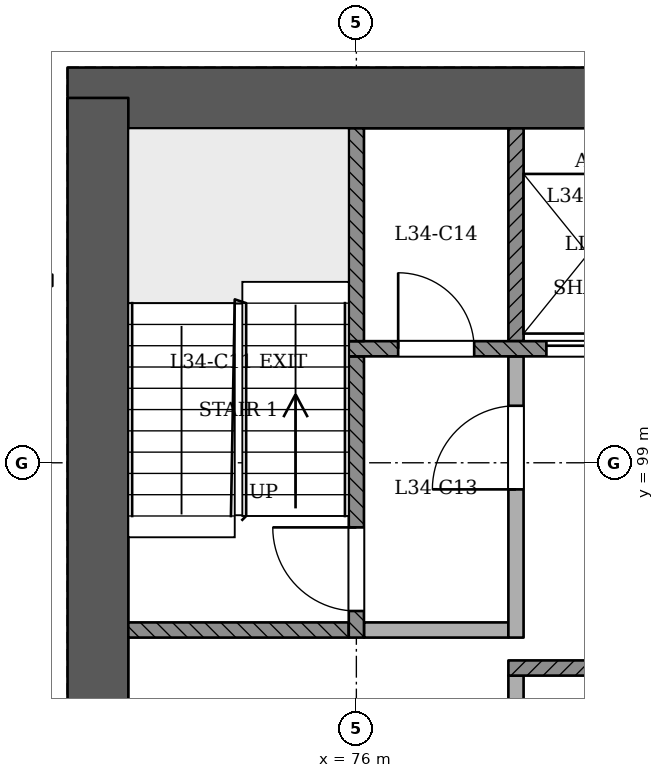
"""IFC4 building model, lengths in metres.
Left out: names, types, materials, properties, quantities, classifications, styles, units other than length and angle.
Written with IfcOpenShell. Run it as: python <this file> out.ifc"""

import sys

from ifc_helpers import new_model, si_unit, direction, frame, frame_2d, origin, place, context, subcontext, project, spatial, rectangle, extrude, element, fill, save


model = new_model("IFC4")
c1 = context("Model", 3, precision=1e-05, world=origin(), true_north=direction((0.0, 1.0)))
c2 = subcontext(c1, "Body", "Model", "MODEL_VIEW")
j1 = project(units=[si_unit("LENGTHUNIT", "METRE"), si_unit("PLANEANGLEUNIT", "RADIAN")], contexts=[c1])
p1 = place(None, origin())
s1 = spatial("IfcSite", under=j1, at=p1, CompositionType="ELEMENT")
p2 = place(p1, origin())
s2 = spatial("IfcBuilding", under=s1, at=p2, CompositionType="ELEMENT")
p3 = place(p2, frame((0.0, 0.0, 135.0)))
s3 = spatial("IfcBuildingStorey", under=s2, at=p3, CompositionType="ELEMENT", Elevation=135.0)
p4 = place(p3, frame((97.4, 103.8, 0.0), z_axis=(0.0, 0.0, 1.0), x_axis=(-1.0, 0.0, 0.0)))
e1 = element("IfcWall", 1, at=p4, inside=s3, PredefinedType="SHEAR", context=c2, shape_type="SweptSolid", body=[
    extrude(rectangle(XDim=25.2, YDim=0.8, at=frame_2d((12.6, 0.0))), origin(), (0.0, 0.0, 1.0), 3.6),
])
p5 = place(p3, frame((72.6, 103.8, 0.0), z_axis=(0.0, 0.0, 1.0), x_axis=(0.0, -1.0, 0.0)))
e2 = element("IfcWall", 2, at=p5, inside=s3, PredefinedType="SHEAR", context=c2, shape_type="SweptSolid", body=[
    extrude(rectangle(XDim=11.2, YDim=0.8, at=frame_2d((5.6, 0.0))), origin(), (0.0, 0.0, 1.0), 3.6),
])
p6 = place(p3, frame((64.777, 98.34, 0.0), z_axis=(0.0, 0.0, 1.0), x_axis=(0.499997513821, -0.866026839176, 0.0)))
e3 = element("IfcWall", 3, at=p6, inside=s3, PredefinedType="PARTITIONING", context=c2, shape_type="SweptSolid", body=[
    extrude(rectangle(XDim=40.26, YDim=0.15, at=frame_2d((20.13, 0.0))), origin(), (0.0, 0.0, 1.0), 2.75),
])
p7 = place(p6, frame((0.2, 0.0, 0.0)))
e4 = element("IfcOpeningElement", 4, at=p7, cuts=e3, PredefinedType="OPENING", context=c2, shape_type="SweptSolid", body=[
    extrude(rectangle(XDim=1.2, YDim=2.1, at=frame_2d((0.6, 1.05))), frame((0.0, 0.085, 0.0), z_axis=(0.0, -1.0, 0.0), x_axis=(1.0, 0.0, 0.0)), (0.0, 0.0, 1.0), 0.171),
])
p8 = place(p6, frame((9.525, 0.0, 0.0)))
e5 = element("IfcOpeningElement", 5, at=p8, cuts=e3, PredefinedType="OPENING", context=c2, shape_type="SweptSolid", body=[
    extrude(rectangle(XDim=1.0, YDim=2.1, at=frame_2d((0.5, 1.05))), frame((0.0, 0.085, 0.0), z_axis=(0.0, -1.0, 0.0), x_axis=(1.0, 0.0, 0.0)), (0.0, 0.0, 1.0), 0.171),
])
p9 = place(p6, frame((11.735, 0.0, 0.0)))
e6 = element("IfcOpeningElement", 6, at=p9, cuts=e3, PredefinedType="OPENING", context=c2, shape_type="SweptSolid", body=[
    extrude(rectangle(XDim=1.0, YDim=2.1, at=frame_2d((0.5, 1.05))), frame((0.0, 0.085, 0.0), z_axis=(0.0, -1.0, 0.0), x_axis=(1.0, 0.0, 0.0)), (0.0, 0.0, 1.0), 0.171),
])
p10 = place(p6, frame((19.53, 0.0, 0.0)))
e7 = element("IfcOpeningElement", 7, at=p10, cuts=e3, PredefinedType="OPENING", context=c2, shape_type="SweptSolid", body=[
    extrude(rectangle(XDim=1.2, YDim=2.1, at=frame_2d((0.6, 1.05))), frame((0.0, 0.085, 0.0), z_axis=(0.0, -1.0, 0.0), x_axis=(1.0, 0.0, 0.0)), (0.0, 0.0, 1.0), 0.171),
])
p11 = place(p6, frame((27.41, 0.0, 0.0)))
e8 = element("IfcOpeningElement", 8, at=p11, cuts=e3, PredefinedType="OPENING", context=c2, shape_type="SweptSolid", body=[
    extrude(rectangle(XDim=1.0, YDim=2.1, at=frame_2d((0.5, 1.05))), frame((0.0, 0.085, 0.0), z_axis=(0.0, -1.0, 0.0), x_axis=(1.0, 0.0, 0.0)), (0.0, 0.0, 1.0), 0.171),
])
p12 = place(p6, frame((34.13, 0.0, 0.0)))
e9 = element("IfcOpeningElement", 9, at=p12, cuts=e3, PredefinedType="OPENING", context=c2, shape_type="SweptSolid", body=[
    extrude(rectangle(XDim=1.2, YDim=2.1, at=frame_2d((0.6, 1.05))), frame((0.0, 0.085, 0.0), z_axis=(0.0, -1.0, 0.0), x_axis=(1.0, 0.0, 0.0)), (0.0, 0.0, 1.0), 0.171),
])
p13 = place(p6, frame((38.78, 0.0, 0.0)))
e10 = element("IfcOpeningElement", 10, at=p13, cuts=e3, PredefinedType="OPENING", context=c2, shape_type="SweptSolid", body=[
    extrude(rectangle(XDim=1.0, YDim=2.1, at=frame_2d((0.5, 1.05))), frame((0.0, 0.085, 0.0), z_axis=(0.0, -1.0, 0.0), x_axis=(1.0, 0.0, 0.0)), (0.0, 0.0, 1.0), 0.171),
])
p14 = place(p3, frame((78.1, 93.4, 0.0), z_axis=(0.0, 0.0, 1.0), x_axis=(0.0, 1.0, 0.0)))
e11 = element("IfcWall", 11, at=p14, inside=s3, PredefinedType="PARTITIONING", context=c2, shape_type="SweptSolid", body=[
    extrude(rectangle(XDim=2.8, YDim=0.2, at=frame_2d((1.4, 0.0))), origin(), (0.0, 0.0, 1.0), 3.15),
])
p15 = place(p3, frame((78.0, 96.3, 0.0), z_axis=(0.0, 0.0, 1.0), x_axis=(1.0, 0.0, 0.0)))
e12 = element("IfcWall", 12, at=p15, inside=s3, PredefinedType="SOLIDWALL", context=c2, shape_type="SweptSolid", body=[
    extrude(rectangle(XDim=7.8, YDim=0.2, at=frame_2d((3.9, 0.0))), origin(), (0.0, 0.0, 1.0), 3.15),
])
p16 = place(p15, frame((1.5, 0.0, 0.0)))
e13 = element("IfcOpeningElement", 13, at=p16, cuts=e12, PredefinedType="OPENING", context=c2, shape_type="SweptSolid", body=[
    extrude(rectangle(XDim=1.0, YDim=2.1, at=frame_2d((0.5, 1.05))), frame((0.0, 0.11, 0.0), z_axis=(0.0, -1.0, 0.0), x_axis=(1.0, 0.0, 0.0)), (0.0, 0.0, 1.0), 0.221),
])
p17 = place(p3, frame((73.0, 96.8, 0.0), z_axis=(0.0, 0.0, 1.0), x_axis=(1.0, 0.0, 0.0)))
e14 = element("IfcWall", 14, at=p17, inside=s3, PredefinedType="SOLIDWALL", context=c2, shape_type="SweptSolid", body=[
    extrude(rectangle(XDim=2.9, YDim=0.2, at=frame_2d((1.45, 0.0))), origin(), (0.0, 0.0, 1.0), 3.15),
])
p18 = place(p3, frame((76.0, 96.7, 0.0), z_axis=(0.0, 0.0, 1.0), x_axis=(0.0, 1.0, 0.0)))
e15 = element("IfcWall", 15, at=p18, inside=s3, PredefinedType="SOLIDWALL", context=c2, shape_type="SweptSolid", body=[
    extrude(rectangle(XDim=3.7, YDim=0.2, at=frame_2d((1.85, 0.0))), origin(), (0.0, 0.0, 1.0), 3.15),
])
p19 = place(p18, frame((0.35, 0.0, 0.0)))
e16 = element("IfcOpeningElement", 16, at=p19, cuts=e15, PredefinedType="OPENING", context=c2, shape_type="SweptSolid", body=[
    extrude(rectangle(XDim=1.1, YDim=2.1, at=frame_2d((0.55, 1.05))), frame((0.0, 0.11, 0.0), z_axis=(0.0, -1.0, 0.0), x_axis=(1.0, 0.0, 0.0)), (0.0, 0.0, 1.0), 0.221),
])
p20 = place(p3, frame((76.1, 96.8, 0.0), z_axis=(0.0, 0.0, 1.0), x_axis=(1.0, 0.0, 0.0)))
e17 = element("IfcWall", 17, at=p20, inside=s3, PredefinedType="PARTITIONING", context=c2, shape_type="SweptSolid", body=[
    extrude(rectangle(XDim=1.9, YDim=0.2, at=frame_2d((0.95, 0.0))), origin(), (0.0, 0.0, 1.0), 3.15),
])
p21 = place(p3, frame((78.1, 96.7, 0.0), z_axis=(0.0, 0.0, 1.0), x_axis=(0.0, 1.0, 0.0)))
e18 = element("IfcWall", 18, at=p21, inside=s3, PredefinedType="PARTITIONING", context=c2, shape_type="SweptSolid", body=[
    extrude(rectangle(XDim=3.7, YDim=0.2, at=frame_2d((1.85, 0.0))), origin(), (0.0, 0.0, 1.0), 3.15),
])
p22 = place(p21, frame((1.95, 0.0, 0.0)))
e19 = element("IfcOpeningElement", 19, at=p22, cuts=e18, PredefinedType="OPENING", context=c2, shape_type="SweptSolid", body=[
    extrude(rectangle(XDim=1.1, YDim=2.1, at=frame_2d((0.55, 1.05))), frame((0.0, 0.11, 0.0), z_axis=(0.0, -1.0, 0.0), x_axis=(1.0, 0.0, 0.0)), (0.0, 0.0, 1.0), 0.221),
])
p23 = place(p3, frame((75.9, 100.5, 0.0), z_axis=(0.0, 0.0, 1.0), x_axis=(1.0, 0.0, 0.0)))
e20 = element("IfcWall", 20, at=p23, inside=s3, PredefinedType="SOLIDWALL", context=c2, shape_type="SweptSolid", body=[
    extrude(rectangle(XDim=18.2, YDim=0.2, at=frame_2d((9.1, 0.0))), origin(), (0.0, 0.0, 1.0), 3.15),
])
p24 = place(p23, frame((2.6, 0.0, 0.0)))
e21 = element("IfcOpeningElement", 21, at=p24, cuts=e20, PredefinedType="OPENING", context=c2, shape_type="SweptSolid", body=[
    extrude(rectangle(XDim=1.1, YDim=2.1, at=frame_2d((0.55, 1.05))), frame((0.0, 0.11, 0.0), z_axis=(0.0, -1.0, 0.0), x_axis=(1.0, 0.0, 0.0)), (0.0, 0.0, 1.0), 0.221),
])
p25 = place(p23, frame((4.5, 0.0, 0.0)))
e22 = element("IfcOpeningElement", 22, at=p25, cuts=e20, PredefinedType="OPENING", context=c2, shape_type="SweptSolid", body=[
    extrude(rectangle(XDim=1.1, YDim=2.1, at=frame_2d((0.55, 1.05))), frame((0.0, 0.11, 0.0), z_axis=(0.0, -1.0, 0.0), x_axis=(1.0, 0.0, 0.0)), (0.0, 0.0, 1.0), 0.221),
])
p26 = place(p23, frame((6.4, 0.0, 0.0)))
e23 = element("IfcOpeningElement", 23, at=p26, cuts=e20, PredefinedType="OPENING", context=c2, shape_type="SweptSolid", body=[
    extrude(rectangle(XDim=1.1, YDim=2.1, at=frame_2d((0.55, 1.05))), frame((0.0, 0.11, 0.0), z_axis=(0.0, -1.0, 0.0), x_axis=(1.0, 0.0, 0.0)), (0.0, 0.0, 1.0), 0.221),
])
p27 = place(p23, frame((8.3, 0.0, 0.0)))
e24 = element("IfcOpeningElement", 24, at=p27, cuts=e20, PredefinedType="OPENING", context=c2, shape_type="SweptSolid", body=[
    extrude(rectangle(XDim=1.1, YDim=2.1, at=frame_2d((0.55, 1.05))), frame((0.0, 0.11, 0.0), z_axis=(0.0, -1.0, 0.0), x_axis=(1.0, 0.0, 0.0)), (0.0, 0.0, 1.0), 0.221),
])
p28 = place(p23, frame((10.2, 0.0, 0.0)))
e25 = element("IfcOpeningElement", 25, at=p28, cuts=e20, PredefinedType="OPENING", context=c2, shape_type="SweptSolid", body=[
    extrude(rectangle(XDim=1.1, YDim=2.1, at=frame_2d((0.55, 1.05))), frame((0.0, 0.11, 0.0), z_axis=(0.0, -1.0, 0.0), x_axis=(1.0, 0.0, 0.0)), (0.0, 0.0, 1.0), 0.221),
])
p29 = place(p23, frame((12.1, 0.0, 0.0)))
e26 = element("IfcOpeningElement", 26, at=p29, cuts=e20, PredefinedType="OPENING", context=c2, shape_type="SweptSolid", body=[
    extrude(rectangle(XDim=1.1, YDim=2.1, at=frame_2d((0.55, 1.05))), frame((0.0, 0.11, 0.0), z_axis=(0.0, -1.0, 0.0), x_axis=(1.0, 0.0, 0.0)), (0.0, 0.0, 1.0), 0.221),
])
p30 = place(p23, frame((14.0, 0.0, 0.0)))
e27 = element("IfcOpeningElement", 27, at=p30, cuts=e20, PredefinedType="OPENING", context=c2, shape_type="SweptSolid", body=[
    extrude(rectangle(XDim=1.1, YDim=2.1, at=frame_2d((0.55, 1.05))), frame((0.0, 0.11, 0.0), z_axis=(0.0, -1.0, 0.0), x_axis=(1.0, 0.0, 0.0)), (0.0, 0.0, 1.0), 0.221),
])
p31 = place(p23, frame((0.65, 0.0, 0.0)))
e28 = element("IfcOpeningElement", 28, at=p31, cuts=e20, PredefinedType="OPENING", context=c2, shape_type="SweptSolid", body=[
    extrude(rectangle(XDim=1.0, YDim=2.1, at=frame_2d((0.5, 1.05))), frame((0.0, 0.11, 0.0), z_axis=(0.0, -1.0, 0.0), x_axis=(1.0, 0.0, 0.0)), (0.0, 0.0, 1.0), 0.221),
])
p32 = place(p23, frame((16.3, 0.0, 0.0)))
e29 = element("IfcOpeningElement", 29, at=p32, cuts=e20, PredefinedType="OPENING", context=c2, shape_type="SweptSolid", body=[
    extrude(rectangle(XDim=1.0, YDim=2.1, at=frame_2d((0.5, 1.05))), frame((0.0, 0.11, 0.0), z_axis=(0.0, -1.0, 0.0), x_axis=(1.0, 0.0, 0.0)), (0.0, 0.0, 1.0), 0.221),
])
for number, where, z_axis, x_axis in (
    (30, (76.0, 100.6, 0.0), (0.0, 0.0, 1.0), (0.0, 1.0, 0.0)),
    (31, (78.1, 100.6, 0.0), (0.0, 0.0, 1.0), (0.0, 1.0, 0.0)),
):
    element("IfcWall", number, at=place(p3, frame(where, z_axis=z_axis, x_axis=x_axis)), inside=s3, PredefinedType="SOLIDWALL", context=c2, shape_type="SweptSolid", body=[
        extrude(rectangle(XDim=2.8, YDim=0.2, at=frame_2d((1.4, 0.0))), origin(), (0.0, 0.0, 1.0), 3.15),
    ])
p33 = place(p24, origin())
e32 = element("IfcDoor", 32, at=p33, inside=s3, OperationType="SLIDING_TO_RIGHT", PredefinedType="NOTDEFINED", context=c2, shape_type="SweptSolid", body=[
    extrude(rectangle(XDim=1.1, YDim=2.1, at=frame_2d((0.55, 1.05))), frame((0.0, 0.025, 0.0), z_axis=(0.0, -1.0, 0.0), x_axis=(1.0, 0.0, 0.0)), (0.0, 0.0, 1.0), 0.05),
])
fill(e21, e32)
p34 = place(p19, origin())
e33 = element("IfcDoor", 33, at=p34, inside=s3, OperationType="SINGLE_SWING_RIGHT", PredefinedType="NOTDEFINED", context=c2, shape_type="SweptSolid", body=[
    extrude(rectangle(XDim=1.1, YDim=2.1, at=frame_2d((0.55, 1.05))), frame((0.0, 0.025, 0.0), z_axis=(0.0, -1.0, 0.0), x_axis=(1.0, 0.0, 0.0)), (0.0, 0.0, 1.0), 0.05),
])
fill(e16, e33)
p35 = place(p22, origin())
e34 = element("IfcDoor", 34, at=p35, inside=s3, OperationType="SINGLE_SWING_LEFT", PredefinedType="NOTDEFINED", context=c2, shape_type="SweptSolid", body=[
    extrude(rectangle(XDim=1.1, YDim=2.1, at=frame_2d((0.55, 1.05))), frame((0.0, 0.025, 0.0), z_axis=(0.0, -1.0, 0.0), x_axis=(1.0, 0.0, 0.0)), (0.0, 0.0, 1.0), 0.05),
])
fill(e19, e34)
p36 = place(p31, origin())
e35 = element("IfcDoor", 35, at=p36, inside=s3, OperationType="SINGLE_SWING_LEFT", PredefinedType="NOTDEFINED", context=c2, shape_type="SweptSolid", body=[
    extrude(rectangle(XDim=1.0, YDim=2.1, at=frame_2d((0.5, 1.05))), frame((0.0, 0.025, 0.0), z_axis=(0.0, -1.0, 0.0), x_axis=(1.0, 0.0, 0.0)), (0.0, 0.0, 1.0), 0.05),
])
fill(e28, e35)
save(model, sys.argv[1])
